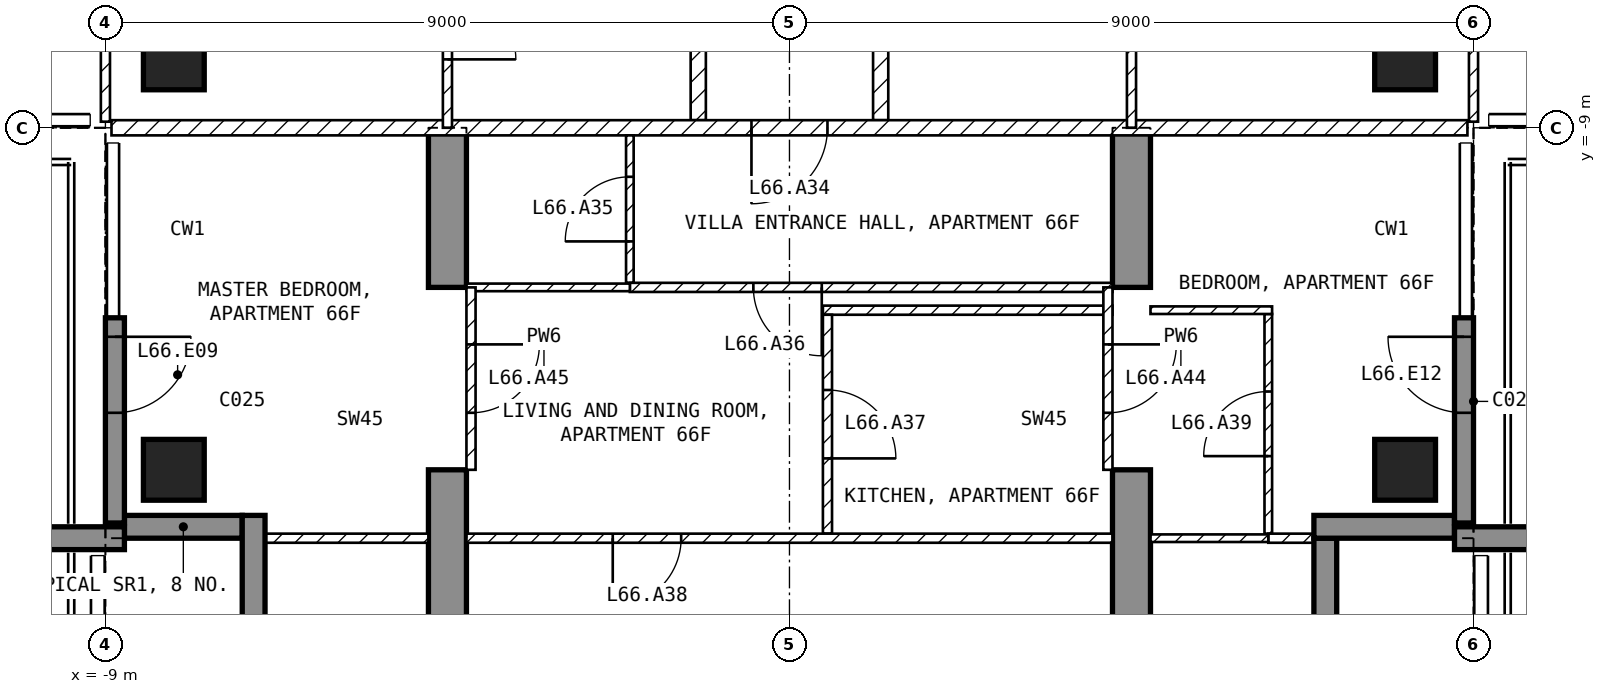
"""IFC4 building model, lengths in metres.
Left out: names, types, materials, properties, quantities, classifications, styles, units other than length and angle.
Written with IfcOpenShell. Run it as: python <this file> out.ifc"""

import sys

from ifc_helpers import new_model, si_unit, direction, frame, frame_2d, origin, origin_2d, place, context, subcontext, project, spatial, polyline, rectangle, outline, extrude, element, fill, save


model = new_model("IFC4")
c1 = context("Model", 3, precision=1e-05, world=origin(), true_north=direction((0.0, 1.0)))
c2 = subcontext(c1, "Body", "Model", "MODEL_VIEW")
j1 = project(units=[si_unit("LENGTHUNIT", "METRE"), si_unit("PLANEANGLEUNIT", "RADIAN")], contexts=[c1])
p1 = place(None, origin())
s1 = spatial("IfcSite", under=j1, at=p1, CompositionType="ELEMENT")
p2 = place(p1, origin())
s2 = spatial("IfcBuilding", under=s1, at=p2, CompositionType="ELEMENT")
p3 = place(p2, frame((0.0, 0.0, 260.5)))
s3 = spatial("IfcBuildingStorey", under=s2, at=p3, CompositionType="ELEMENT", Elevation=260.5)
for number, where, z_axis, x_axis in (
    (1, (-8.1, -13.5, -0.25), (0.0, 0.0, 1.0), (1.0, 0.0, 0.0)),
    (2, (-8.1, -8.1, -0.25), (0.0, 0.0, 1.0), (1.0, 0.0, 0.0)),
    (3, (8.1, -13.5, -0.25), (0.0, 0.0, 1.0), (1.0, 0.0, 0.0)),
    (4, (8.1, -8.1, -0.25), (0.0, 0.0, 1.0), (1.0, 0.0, 0.0)),
):
    element("IfcColumn", number, at=place(p3, frame(where, z_axis=z_axis, x_axis=x_axis)), inside=s3, PredefinedType="COLUMN", context=c2, shape_type="SweptSolid", body=[
        extrude(rectangle(XDim=0.8, YDim=0.8, at=origin_2d()), origin(), (0.0, 0.0, 1.0), 3.5),
    ])
for number, where, z_axis, x_axis in (
    (5, (-4.75, -16.7, -0.25), (1.0, 0.0, 0.0), (0.0, 1.0, 0.0)),
    (6, (4.25, -16.7, -0.25), (1.0, 0.0, 0.0), (0.0, 1.0, 0.0)),
):
    element("IfcWall", number, at=place(p3, frame(where, z_axis=z_axis, x_axis=x_axis)), inside=s3, PredefinedType="SHEAR", context=c2, shape_type="SweptSolid", body=[
        extrude(outline(polyline([(0.0, 0.0), (3.2, 0.0), (3.2, 2.65), (5.6, 2.65), (5.6, 0.0), (7.7, 0.0), (7.7, 3.5), (0.0, 3.5), (0.0, 0.0)])), origin(), (0.0, 0.0, 1.0), 0.5),
    ])
p4 = place(p3, frame((-8.875, -11.5, 0.0), z_axis=(0.0, 0.0, 1.0), x_axis=(0.0, -1.0, 0.0)))
e7 = element("IfcWall", 7, at=p4, inside=s3, PredefinedType="SOLIDWALL", context=c2, shape_type="SweptSolid", body=[
    extrude(rectangle(XDim=2.7, YDim=0.25, at=frame_2d((1.35, 0.0))), origin(), (0.0, 0.0, 1.0), 3.25),
])
p5 = place(p4, frame((0.25, 0.0, 0.0)))
e8 = element("IfcOpeningElement", 8, at=p5, cuts=e7, PredefinedType="OPENING", context=c2, shape_type="SweptSolid", body=[
    extrude(rectangle(XDim=1.0, YDim=2.4, at=frame_2d((0.5, 1.2))), frame((0.0, 0.135, 0.0), z_axis=(0.0, -1.0, 0.0), x_axis=(1.0, 0.0, 0.0)), (0.0, 0.0, 1.0), 0.27),
])
p6 = place(p3, frame((8.875, -14.2, 0.0), z_axis=(0.0, 0.0, 1.0), x_axis=(0.0, 1.0, 0.0)))
e9 = element("IfcWall", 9, at=p6, inside=s3, PredefinedType="SOLIDWALL", context=c2, shape_type="SweptSolid", body=[
    extrude(rectangle(XDim=2.7, YDim=0.25, at=frame_2d((1.35, 0.0))), origin(), (0.0, 0.0, 1.0), 3.25),
])
p7 = place(p6, frame((1.45, 0.0, 0.0)))
e10 = element("IfcOpeningElement", 10, at=p7, cuts=e9, PredefinedType="OPENING", context=c2, shape_type="SweptSolid", body=[
    extrude(rectangle(XDim=1.0, YDim=2.4, at=frame_2d((0.5, 1.2))), frame((0.0, 0.135, 0.0), z_axis=(0.0, -1.0, 0.0), x_axis=(1.0, 0.0, 0.0)), (0.0, 0.0, 1.0), 0.27),
])
p8 = place(p3, frame((7.05, -16.2, 0.0), z_axis=(0.0, 0.0, 1.0), x_axis=(0.0, 1.0, 0.0)))
e11 = element("IfcWall", 11, at=p8, inside=s3, PredefinedType="SOLIDWALL", context=c2, shape_type="SweptSolid", body=[
    extrude(rectangle(XDim=1.8, YDim=0.3, at=frame_2d((0.9, 0.0))), origin(), (0.0, 0.0, 1.0), 3.25),
])
p9 = place(p3, frame((6.9, -14.25, 0.0), z_axis=(0.0, 0.0, 1.0), x_axis=(1.0, 0.0, 0.0)))
e12 = element("IfcWall", 12, at=p9, inside=s3, PredefinedType="SOLIDWALL", context=c2, shape_type="SweptSolid", body=[
    extrude(rectangle(XDim=1.85, YDim=0.3, at=frame_2d((0.925, 0.0))), origin(), (0.0, 0.0, 1.0), 3.25),
])
p10 = place(p3, frame((-8.75, -14.25, 0.0), z_axis=(0.0, 0.0, 1.0), x_axis=(1.0, 0.0, 0.0)))
e13 = element("IfcWall", 13, at=p10, inside=s3, PredefinedType="SOLIDWALL", context=c2, shape_type="SweptSolid", body=[
    extrude(rectangle(XDim=1.55, YDim=0.3, at=frame_2d((0.775, 0.0))), origin(), (0.0, 0.0, 1.0), 3.25),
])
p11 = place(p3, frame((-7.05, -14.1, 0.0), z_axis=(0.0, 0.0, 1.0), x_axis=(0.0, -1.0, 0.0)))
e14 = element("IfcWall", 14, at=p11, inside=s3, PredefinedType="SOLIDWALL", context=c2, shape_type="SweptSolid", body=[
    extrude(rectangle(XDim=1.8, YDim=0.3, at=frame_2d((0.9, 0.0))), origin(), (0.0, 0.0, 1.0), 3.25),
])
for number, where, z_axis, x_axis in (
    (15, (-8.75, -14.4, 0.0), (0.0, 0.0, 1.0), (-1.0, 0.0, 0.0)),
    (16, (8.75, -14.4, 0.0), (0.0, 0.0, 1.0), (1.0, 0.0, 0.0)),
):
    element("IfcWall", number, at=place(p3, frame(where, z_axis=z_axis, x_axis=x_axis)), inside=s3, PredefinedType="SOLIDWALL", context=c2, shape_type="SweptSolid", body=[
        extrude(rectangle(XDim=2.95, YDim=0.3, at=frame_2d((1.475, 0.0))), origin(), (0.0, 0.0, 1.0), 3.25),
    ])
for number, where, z_axis, x_axis in (
    (17, (1.2, -4.6, 0.0), (0.0, 0.0, 1.0), (0.0, -1.0, 0.0)),
    (18, (-1.2, -8.9, 0.0), (0.0, 0.0, 1.0), (0.0, 1.0, 0.0)),
):
    element("IfcWall", number, at=place(p3, frame(where, z_axis=z_axis, x_axis=x_axis)), inside=s3, PredefinedType="PARTITIONING", context=c2, shape_type="SweptSolid", body=[
        extrude(rectangle(XDim=4.3, YDim=0.2, at=frame_2d((2.15, 0.0))), origin(), (0.0, 0.0, 1.0), 3.25),
    ])
p12 = place(p3, frame((8.92, -9.0, 0.0), z_axis=(0.0, 0.0, 1.0), x_axis=(-1.0, 0.0, 0.0)))
e19 = element("IfcWall", 19, at=p12, inside=s3, PredefinedType="PARTITIONING", context=c2, shape_type="SweptSolid", body=[
    extrude(rectangle(XDim=17.84, YDim=0.2, at=frame_2d((8.92, 0.0))), origin(), (0.0, 0.0, 1.0), 3.25),
])
p13 = place(p12, frame((8.42, 0.0, 0.0)))
e20 = element("IfcOpeningElement", 20, at=p13, cuts=e19, PredefinedType="OPENING", context=c2, shape_type="SweptSolid", body=[
    extrude(rectangle(XDim=1.0, YDim=2.1, at=frame_2d((0.5, 1.05))), frame((0.0, 0.11, 0.0), z_axis=(0.0, -1.0, 0.0), x_axis=(1.0, 0.0, 0.0)), (0.0, 0.0, 1.0), 0.22),
])
p14 = place(p3, frame((9.0, -8.92, 0.0), z_axis=(0.0, 0.0, 1.0), x_axis=(0.0, 1.0, 0.0)))
e21 = element("IfcWall", 21, at=p14, inside=s3, PredefinedType="PARTITIONING", context=c2, shape_type="SweptSolid", body=[
    extrude(rectangle(XDim=5.32, YDim=0.12, at=frame_2d((2.66, 0.0))), origin(), (0.0, 0.0, 1.0), 3.25),
])
p15 = place(p14, frame((2.32, 0.0, 0.0)))
e22 = element("IfcOpeningElement", 22, at=p15, cuts=e21, PredefinedType="OPENING", context=c2, shape_type="SweptSolid", body=[
    extrude(rectangle(XDim=0.9, YDim=2.1, at=frame_2d((0.45, 1.05))), frame((0.0, 0.07, 0.0), z_axis=(0.0, -1.0, 0.0), x_axis=(1.0, 0.0, 0.0)), (0.0, 0.0, 1.0), 0.14),
])
p16 = place(p3, frame((4.5, -9.0, 0.0), z_axis=(0.0, 0.0, 1.0), x_axis=(0.0, 1.0, 0.0)))
e23 = element("IfcWall", 23, at=p16, inside=s3, PredefinedType="PARTITIONING", context=c2, shape_type="SweptSolid", body=[
    extrude(rectangle(XDim=4.5, YDim=0.12, at=frame_2d((2.25, 0.0))), origin(), (0.0, 0.0, 1.0), 3.25),
])
p17 = place(p16, frame((1.8, 0.0, 0.0)))
e24 = element("IfcOpeningElement", 24, at=p17, cuts=e23, PredefinedType="OPENING", context=c2, shape_type="SweptSolid", body=[
    extrude(rectangle(XDim=0.9, YDim=2.1, at=frame_2d((0.45, 1.05))), frame((0.0, 0.07, 0.0), z_axis=(0.0, -1.0, 0.0), x_axis=(1.0, 0.0, 0.0)), (0.0, 0.0, 1.0), 0.14),
])
p18 = place(p3, frame((-9.0, -1.3, 0.0), z_axis=(0.0, 0.0, 1.0), x_axis=(0.0, -1.0, 0.0)))
e25 = element("IfcWall", 25, at=p18, inside=s3, PredefinedType="PARTITIONING", context=c2, shape_type="SweptSolid", body=[
    extrude(rectangle(XDim=7.62, YDim=0.12, at=frame_2d((3.81, 0.0))), origin(), (0.0, 0.0, 1.0), 3.25),
])
p19 = place(p18, frame((4.4, 0.0, 0.0)))
e26 = element("IfcOpeningElement", 26, at=p19, cuts=e25, PredefinedType="OPENING", context=c2, shape_type="SweptSolid", body=[
    extrude(rectangle(XDim=0.9, YDim=2.1, at=frame_2d((0.45, 1.05))), frame((0.0, 0.07, 0.0), z_axis=(0.0, -1.0, 0.0), x_axis=(1.0, 0.0, 0.0)), (0.0, 0.0, 1.0), 0.14),
])
p20 = place(p3, frame((-4.5, -6.3, 0.0), z_axis=(0.0, 0.0, 1.0), x_axis=(0.0, -1.0, 0.0)))
e27 = element("IfcWall", 27, at=p20, inside=s3, PredefinedType="PARTITIONING", context=c2, shape_type="SweptSolid", body=[
    extrude(rectangle(XDim=2.7, YDim=0.12, at=frame_2d((1.35, 0.0))), origin(), (0.0, 0.0, 1.0), 3.25),
])
p21 = place(p20, frame((0.9, 0.0, 0.0)))
e28 = element("IfcOpeningElement", 28, at=p21, cuts=e27, PredefinedType="OPENING", context=c2, shape_type="SweptSolid", body=[
    extrude(rectangle(XDim=0.9, YDim=2.1, at=frame_2d((0.45, 1.05))), frame((0.0, 0.07, 0.0), z_axis=(0.0, -1.0, 0.0), x_axis=(1.0, 0.0, 0.0)), (0.0, 0.0, 1.0), 0.14),
])
p22 = place(p3, frame((-2.1, -11.04, 0.0), z_axis=(0.0, 0.0, 1.0), x_axis=(0.0, 1.0, 0.0)))
e29 = element("IfcWall", 29, at=p22, inside=s3, PredefinedType="PARTITIONING", context=c2, shape_type="SweptSolid", body=[
    extrude(rectangle(XDim=1.94, YDim=0.1, at=frame_2d((0.97, 0.0))), origin(), (0.0, 0.0, 1.0), 3.25),
])
p23 = place(p22, frame((0.545, 0.0, 0.0)))
e30 = element("IfcOpeningElement", 30, at=p23, cuts=e29, PredefinedType="OPENING", context=c2, shape_type="SweptSolid", body=[
    extrude(rectangle(XDim=0.85, YDim=2.1, at=frame_2d((0.425, 1.05))), frame((0.0, 0.06, 0.0), z_axis=(0.0, -1.0, 0.0), x_axis=(1.0, 0.0, 0.0)), (0.0, 0.0, 1.0), 0.12),
])
p24 = place(p3, frame((4.25, -11.1, 0.0), z_axis=(0.0, 0.0, 1.0), x_axis=(-1.0, 0.0, 0.0)))
e31 = element("IfcWall", 31, at=p24, inside=s3, PredefinedType="PARTITIONING", context=c2, shape_type="SweptSolid", body=[
    extrude(rectangle(XDim=6.35, YDim=0.12, at=frame_2d((3.175, 0.0))), origin(), (0.0, 0.0, 1.0), 3.25),
])
p25 = place(p24, frame((3.825, 0.0, 0.0)))
e32 = element("IfcOpeningElement", 32, at=p25, cuts=e31, PredefinedType="OPENING", context=c2, shape_type="SweptSolid", body=[
    extrude(rectangle(XDim=0.9, YDim=2.1, at=frame_2d((0.45, 1.05))), frame((0.0, 0.07, 0.0), z_axis=(0.0, -1.0, 0.0), x_axis=(1.0, 0.0, 0.0)), (0.0, 0.0, 1.0), 0.14),
])
p26 = place(p3, frame((-2.1, -11.1, 0.0), z_axis=(0.0, 0.0, 1.0), x_axis=(-1.0, 0.0, 0.0)))
e33 = element("IfcWall", 33, at=p26, inside=s3, PredefinedType="PARTITIONING", context=c2, shape_type="SweptSolid", body=[
    extrude(rectangle(XDim=2.15, YDim=0.1, at=frame_2d((1.075, 0.0))), origin(), (0.0, 0.0, 1.0), 3.25),
])
p27 = place(p3, frame((4.25, -11.4, 0.0), z_axis=(0.0, 0.0, 1.0), x_axis=(-1.0, 0.0, 0.0)))
e34 = element("IfcWall", 34, at=p27, inside=s3, PredefinedType="PARTITIONING", context=c2, shape_type="SweptSolid", body=[
    extrude(rectangle(XDim=3.81, YDim=0.12, at=frame_2d((1.905, 0.0))), origin(), (0.0, 0.0, 1.0), 3.25),
])
p28 = place(p3, frame((0.5, -11.46, 0.0), z_axis=(0.0, 0.0, 1.0), x_axis=(0.0, -1.0, 0.0)))
e35 = element("IfcWall", 35, at=p28, inside=s3, PredefinedType="PARTITIONING", context=c2, shape_type="SweptSolid", body=[
    extrude(rectangle(XDim=2.88, YDim=0.12, at=frame_2d((1.44, 0.0))), origin(), (0.0, 0.0, 1.0), 3.25),
])
p29 = place(p28, frame((0.99, 0.0, 0.0)))
e36 = element("IfcOpeningElement", 36, at=p29, cuts=e35, PredefinedType="OPENING", context=c2, shape_type="SweptSolid", body=[
    extrude(rectangle(XDim=0.9, YDim=2.1, at=frame_2d((0.45, 1.05))), frame((0.0, 0.07, 0.0), z_axis=(0.0, -1.0, 0.0), x_axis=(1.0, 0.0, 0.0)), (0.0, 0.0, 1.0), 0.14),
])
p30 = place(p3, frame((4.25, -14.4, 0.0), z_axis=(0.0, 0.0, 1.0), x_axis=(-1.0, 0.0, 0.0)))
e37 = element("IfcWall", 37, at=p30, inside=s3, PredefinedType="PARTITIONING", context=c2, shape_type="SweptSolid", body=[
    extrude(rectangle(XDim=8.5, YDim=0.12, at=frame_2d((4.25, 0.0))), origin(), (0.0, 0.0, 1.0), 3.25),
])
p31 = place(p30, frame((5.675, 0.0, 0.0)))
e38 = element("IfcOpeningElement", 38, at=p31, cuts=e37, PredefinedType="OPENING", context=c2, shape_type="SweptSolid", body=[
    extrude(rectangle(XDim=0.9, YDim=2.1, at=frame_2d((0.45, 1.05))), frame((0.0, 0.07, 0.0), z_axis=(0.0, -1.0, 0.0), x_axis=(1.0, 0.0, 0.0)), (0.0, 0.0, 1.0), 0.14),
])
p32 = place(p3, frame((6.3, -14.34, 0.0), z_axis=(0.0, 0.0, 1.0), x_axis=(0.0, 1.0, 0.0)))
e39 = element("IfcWall", 39, at=p32, inside=s3, PredefinedType="PARTITIONING", context=c2, shape_type="SweptSolid", body=[
    extrude(rectangle(XDim=2.89, YDim=0.1, at=frame_2d((1.445, 0.0))), origin(), (0.0, 0.0, 1.0), 3.25),
])
p33 = place(p32, frame((1.02, 0.0, 0.0)))
e40 = element("IfcOpeningElement", 40, at=p33, cuts=e39, PredefinedType="OPENING", context=c2, shape_type="SweptSolid", body=[
    extrude(rectangle(XDim=0.85, YDim=2.1, at=frame_2d((0.425, 1.05))), frame((0.0, 0.06, 0.0), z_axis=(0.0, -1.0, 0.0), x_axis=(1.0, 0.0, 0.0)), (0.0, 0.0, 1.0), 0.12),
])
p34 = place(p3, frame((6.35, -11.4, 0.0), z_axis=(0.0, 0.0, 1.0), x_axis=(-1.0, 0.0, 0.0)))
e41 = element("IfcWall", 41, at=p34, inside=s3, PredefinedType="PARTITIONING", context=c2, shape_type="SweptSolid", body=[
    extrude(rectangle(XDim=1.6, YDim=0.1, at=frame_2d((0.8, 0.0))), origin(), (0.0, 0.0, 1.0), 3.25),
])
p35 = place(p3, frame((7.12, -14.4, 0.0), z_axis=(0.0, 0.0, 1.0), x_axis=(-1.0, 0.0, 0.0)))
e42 = element("IfcWall", 42, at=p35, inside=s3, PredefinedType="PARTITIONING", context=c2, shape_type="SweptSolid", body=[
    extrude(rectangle(XDim=0.82, YDim=0.12, at=frame_2d((0.41, 0.0))), origin(), (0.0, 0.0, 1.0), 3.25),
])
p36 = place(p3, frame((6.3, -14.4, 0.0), z_axis=(0.0, 0.0, 1.0), x_axis=(-1.0, 0.0, 0.0)))
e43 = element("IfcWall", 43, at=p36, inside=s3, PredefinedType="PARTITIONING", context=c2, shape_type="SweptSolid", body=[
    extrude(rectangle(XDim=1.55, YDim=0.1, at=frame_2d((0.775, 0.0))), origin(), (0.0, 0.0, 1.0), 3.25),
])
p37 = place(p3, frame((-4.75, -14.4, 0.0), z_axis=(0.0, 0.0, 1.0), x_axis=(-1.0, 0.0, 0.0)))
e44 = element("IfcWall", 44, at=p37, inside=s3, PredefinedType="PARTITIONING", context=c2, shape_type="SweptSolid", body=[
    extrude(rectangle(XDim=2.37, YDim=0.12, at=frame_2d((1.185, 0.0))), origin(), (0.0, 0.0, 1.0), 3.25),
])
p38 = place(p3, frame((4.19, -11.1, 0.0), z_axis=(0.0, 0.0, 1.0), x_axis=(0.0, -1.0, 0.0)))
e45 = element("IfcWall", 45, at=p38, inside=s3, PredefinedType="PARTITIONING", context=c2, shape_type="SweptSolid", body=[
    extrude(rectangle(XDim=2.4, YDim=0.12, at=frame_2d((1.2, 0.0))), origin(), (0.0, 0.0, 1.0), 2.4),
])
p39 = place(p38, frame((0.75, 0.0, 0.0)))
e46 = element("IfcOpeningElement", 46, at=p39, cuts=e45, PredefinedType="OPENING", context=c2, shape_type="SweptSolid", body=[
    extrude(rectangle(XDim=0.9, YDim=2.1, at=frame_2d((0.45, 1.05))), frame((0.0, 0.07, 0.0), z_axis=(0.0, -1.0, 0.0), x_axis=(1.0, 0.0, 0.0)), (0.0, 0.0, 1.0), 0.14),
])
p40 = place(p3, frame((-4.19, -11.1, 0.0), z_axis=(0.0, 0.0, 1.0), x_axis=(0.0, -1.0, 0.0)))
e47 = element("IfcWall", 47, at=p40, inside=s3, PredefinedType="PARTITIONING", context=c2, shape_type="SweptSolid", body=[
    extrude(rectangle(XDim=2.4, YDim=0.12, at=frame_2d((1.2, 0.0))), origin(), (0.0, 0.0, 1.0), 2.4),
])
p41 = place(p40, frame((0.75, 0.0, 0.0)))
e48 = element("IfcOpeningElement", 48, at=p41, cuts=e47, PredefinedType="OPENING", context=c2, shape_type="SweptSolid", body=[
    extrude(rectangle(XDim=0.9, YDim=2.1, at=frame_2d((0.45, 1.05))), frame((0.0, 0.07, 0.0), z_axis=(0.0, -1.0, 0.0), x_axis=(1.0, 0.0, 0.0)), (0.0, 0.0, 1.0), 0.14),
])
p42 = place(p5, origin())
e49 = element("IfcDoor", 49, at=p42, inside=s3, OperationType="SINGLE_SWING_LEFT", PredefinedType="DOOR", context=c2, shape_type="SweptSolid", body=[
    extrude(rectangle(XDim=1.0, YDim=2.4, at=frame_2d((0.5, 1.2))), frame((0.0, 0.025, 0.0), z_axis=(0.0, -1.0, 0.0), x_axis=(1.0, 0.0, 0.0)), (0.0, 0.0, 1.0), 0.05),
])
fill(e8, e49)
p43 = place(p7, origin())
e50 = element("IfcDoor", 50, at=p43, inside=s3, OperationType="SINGLE_SWING_RIGHT", PredefinedType="DOOR", context=c2, shape_type="SweptSolid", body=[
    extrude(rectangle(XDim=1.0, YDim=2.4, at=frame_2d((0.5, 1.2))), frame((0.0, 0.025, 0.0), z_axis=(0.0, -1.0, 0.0), x_axis=(1.0, 0.0, 0.0)), (0.0, 0.0, 1.0), 0.05),
])
fill(e10, e50)
p44 = place(p21, origin())
e51 = element("IfcDoor", 51, at=p44, inside=s3, OperationType="SINGLE_SWING_RIGHT", PredefinedType="DOOR", context=c2, shape_type="SweptSolid", body=[
    extrude(rectangle(XDim=0.9, YDim=2.1, at=frame_2d((0.45, 1.05))), frame((0.0, 0.025, 0.0), z_axis=(0.0, -1.0, 0.0), x_axis=(1.0, 0.0, 0.0)), (0.0, 0.0, 1.0), 0.05),
])
fill(e28, e51)
p45 = place(p13, origin())
e52 = element("IfcDoor", 52, at=p45, inside=s3, OperationType="SINGLE_SWING_RIGHT", PredefinedType="DOOR", context=c2, shape_type="SweptSolid", body=[
    extrude(rectangle(XDim=1.0, YDim=2.1, at=frame_2d((0.5, 1.05))), frame((0.0, 0.025, 0.0), z_axis=(0.0, -1.0, 0.0), x_axis=(1.0, 0.0, 0.0)), (0.0, 0.0, 1.0), 0.05),
])
fill(e20, e52)
p46 = place(p23, origin())
e53 = element("IfcDoor", 53, at=p46, inside=s3, OperationType="SINGLE_SWING_LEFT", PredefinedType="DOOR", context=c2, shape_type="SweptSolid", body=[
    extrude(rectangle(XDim=0.85, YDim=2.1, at=frame_2d((0.425, 1.05))), frame((0.0, 0.025, 0.0), z_axis=(0.0, -1.0, 0.0), x_axis=(1.0, 0.0, 0.0)), (0.0, 0.0, 1.0), 0.05),
])
fill(e30, e53)
p47 = place(p25, origin())
e54 = element("IfcDoor", 54, at=p47, inside=s3, OperationType="SINGLE_SWING_LEFT", PredefinedType="DOOR", context=c2, shape_type="SweptSolid", body=[
    extrude(rectangle(XDim=0.9, YDim=2.1, at=frame_2d((0.45, 1.05))), frame((0.0, 0.025, 0.0), z_axis=(0.0, -1.0, 0.0), x_axis=(1.0, 0.0, 0.0)), (0.0, 0.0, 1.0), 0.05),
])
fill(e32, e54)
p48 = place(p29, origin())
e55 = element("IfcDoor", 55, at=p48, inside=s3, OperationType="SINGLE_SWING_RIGHT", PredefinedType="DOOR", context=c2, shape_type="SweptSolid", body=[
    extrude(rectangle(XDim=0.9, YDim=2.1, at=frame_2d((0.45, 1.05))), frame((0.0, 0.025, 0.0), z_axis=(0.0, -1.0, 0.0), x_axis=(1.0, 0.0, 0.0)), (0.0, 0.0, 1.0), 0.05),
])
fill(e36, e55)
p49 = place(p31, origin())
e56 = element("IfcDoor", 56, at=p49, inside=s3, OperationType="SINGLE_SWING_RIGHT", PredefinedType="DOOR", context=c2, shape_type="SweptSolid", body=[
    extrude(rectangle(XDim=0.9, YDim=2.1, at=frame_2d((0.45, 1.05))), frame((0.0, 0.025, 0.0), z_axis=(0.0, -1.0, 0.0), x_axis=(1.0, 0.0, 0.0)), (0.0, 0.0, 1.0), 0.05),
])
fill(e38, e56)
p50 = place(p33, origin())
e57 = element("IfcDoor", 57, at=p50, inside=s3, OperationType="SINGLE_SWING_LEFT", PredefinedType="DOOR", context=c2, shape_type="SweptSolid", body=[
    extrude(rectangle(XDim=0.85, YDim=2.1, at=frame_2d((0.425, 1.05))), frame((0.0, 0.025, 0.0), z_axis=(0.0, -1.0, 0.0), x_axis=(1.0, 0.0, 0.0)), (0.0, 0.0, 1.0), 0.05),
])
fill(e40, e57)
p51 = place(p39, origin())
e58 = element("IfcDoor", 58, at=p51, inside=s3, OperationType="SINGLE_SWING_LEFT", PredefinedType="DOOR", context=c2, shape_type="SweptSolid", body=[
    extrude(rectangle(XDim=0.9, YDim=2.1, at=frame_2d((0.45, 1.05))), frame((0.0, 0.025, 0.0), z_axis=(0.0, -1.0, 0.0), x_axis=(1.0, 0.0, 0.0)), (0.0, 0.0, 1.0), 0.05),
])
fill(e46, e58)
p52 = place(p41, origin())
e59 = element("IfcDoor", 59, at=p52, inside=s3, OperationType="SINGLE_SWING_LEFT", PredefinedType="DOOR", context=c2, shape_type="SweptSolid", body=[
    extrude(rectangle(XDim=0.9, YDim=2.1, at=frame_2d((0.45, 1.05))), frame((0.0, 0.025, 0.0), z_axis=(0.0, -1.0, 0.0), x_axis=(1.0, 0.0, 0.0)), (0.0, 0.0, 1.0), 0.05),
])
fill(e48, e59)
save(model, sys.argv[1])
